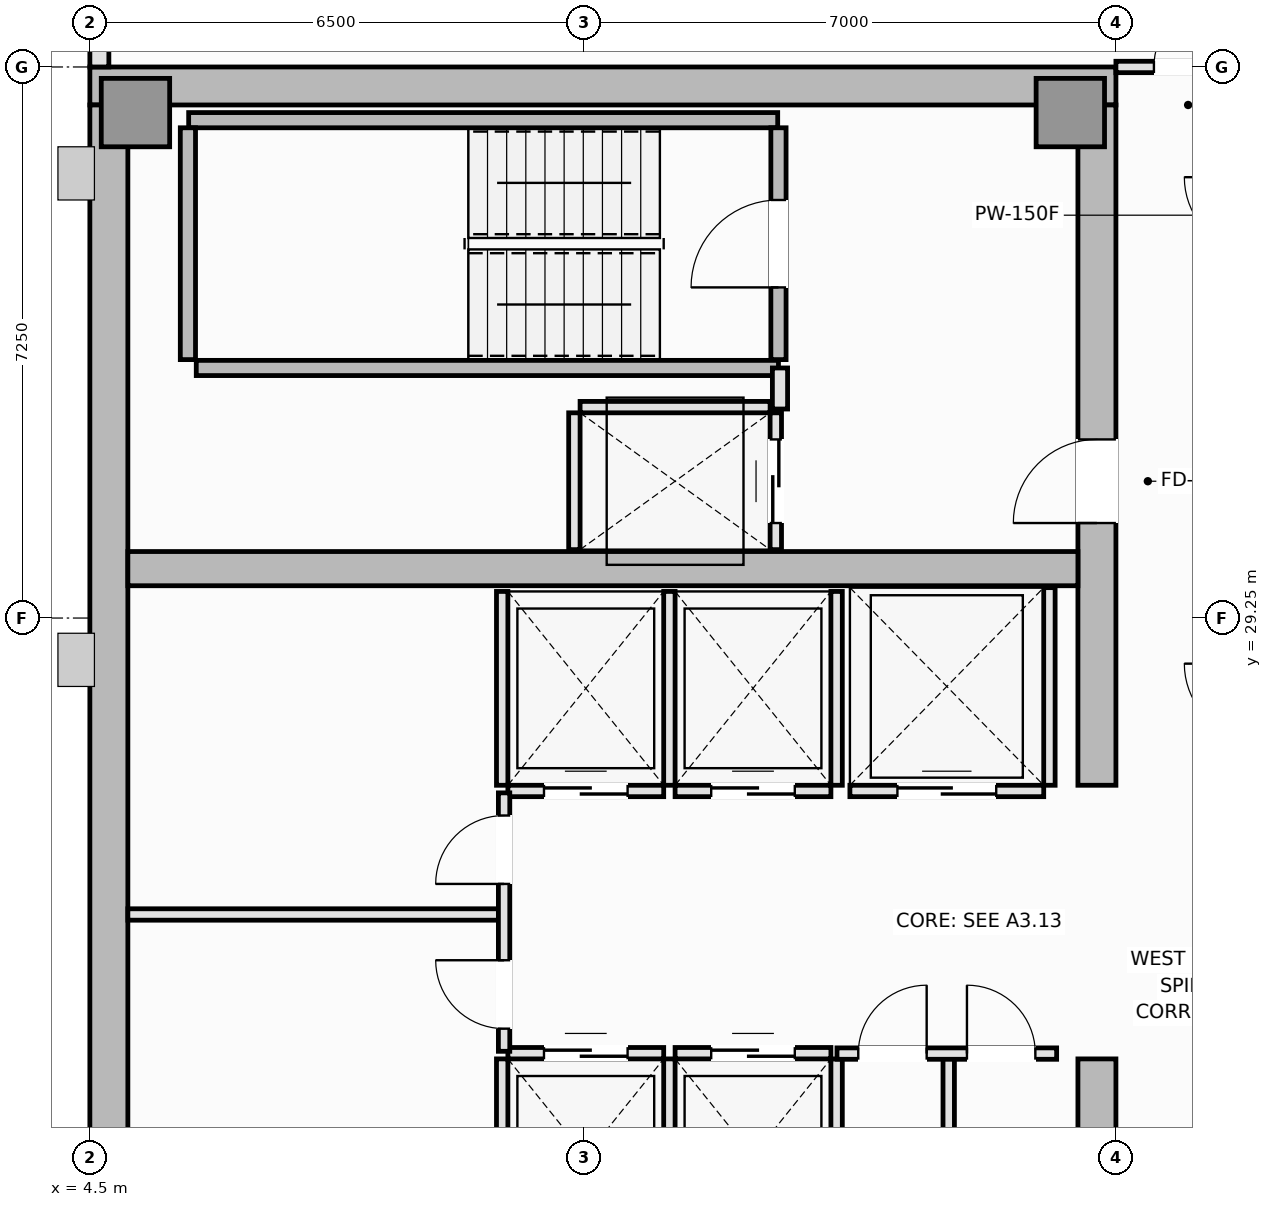
"""IFC4 building model, lengths in metres.
Left out: names, types, materials, properties, quantities, classifications, styles, units other than length and angle.
Written with IfcOpenShell. Run it as: python <this file> out.ifc"""

import sys

from ifc_helpers import new_model, si_unit, direction, frame, frame_2d, origin, origin_2d, place, context, subcontext, project, spatial, rectangle, extrude, element, fill, save


model = new_model("IFC4")
c1 = context("Model", 3, precision=1e-05, world=origin(), true_north=direction((0.0, 1.0)))
c2 = subcontext(c1, "Body", "Model", "MODEL_VIEW")
j1 = project(units=[si_unit("LENGTHUNIT", "METRE"), si_unit("PLANEANGLEUNIT", "RADIAN")], contexts=[c1])
p1 = place(None, origin())
s1 = spatial("IfcSite", under=j1, at=p1, CompositionType="ELEMENT")
p2 = place(p1, origin())
s2 = spatial("IfcBuilding", under=s1, at=p2, CompositionType="ELEMENT")
p3 = place(p2, frame((0.0, 0.0, 249.25)))
s3 = spatial("IfcBuildingStorey", under=s2, at=p3, CompositionType="ELEMENT", Elevation=249.25)
p4 = place(p3, frame((4.5, 36.25, 0.0), z_axis=(0.0, 0.0, 1.0), x_axis=(1.0, 0.0, 0.0)))
e1 = element("IfcWall", 1, at=p4, inside=s3, PredefinedType="SHEAR", context=c2, shape_type="SweptSolid", body=[
    extrude(rectangle(XDim=13.5, YDim=0.5, at=frame_2d((6.75, 0.0))), origin(), (0.0, 0.0, 1.0), 3.55),
])
p5 = place(p3, frame((4.75, 14.5, 0.0), z_axis=(0.0, 0.0, 1.0), x_axis=(0.0, 1.0, 0.0)))
e2 = element("IfcWall", 2, at=p5, inside=s3, PredefinedType="SHEAR", context=c2, shape_type="SweptSolid", body=[
    extrude(rectangle(XDim=21.5, YDim=0.5, at=frame_2d((10.75, 0.0))), origin(), (0.0, 0.0, 1.0), 3.55),
])
p6 = place(p3, frame((17.75, 14.5, 0.0), z_axis=(0.0, 0.0, 1.0), x_axis=(0.0, 1.0, 0.0)))
e3 = element("IfcWall", 3, at=p6, inside=s3, PredefinedType="SHEAR", context=c2, shape_type="SweptSolid", body=[
    extrude(rectangle(XDim=8.95, YDim=0.5, at=frame_2d((4.475, 0.0))), origin(), (0.0, 0.0, 1.0), 3.55),
])
p7 = place(p6, frame((4.4, 0.0, 0.0)))
e4 = element("IfcOpeningElement", 4, at=p7, cuts=e3, PredefinedType="OPENING", context=c2, shape_type="SweptSolid", body=[
    extrude(rectangle(XDim=1.1, YDim=2.15, at=frame_2d((0.55, 1.075))), frame((0.0, 0.26, 0.0), z_axis=(0.0, -1.0, 0.0), x_axis=(1.0, 0.0, 0.0)), (0.0, 0.0, 1.0), 0.52),
])
p8 = place(p3, frame((17.75, 27.05, 0.0), z_axis=(0.0, 0.0, 1.0), x_axis=(0.0, 1.0, 0.0)))
e5 = element("IfcWall", 5, at=p8, inside=s3, PredefinedType="SHEAR", context=c2, shape_type="SweptSolid", body=[
    extrude(rectangle(XDim=8.95, YDim=0.5, at=frame_2d((4.475, 0.0))), origin(), (0.0, 0.0, 1.0), 3.55),
])
p9 = place(p8, frame((3.45, 0.0, 0.0)))
e6 = element("IfcOpeningElement", 6, at=p9, cuts=e5, PredefinedType="OPENING", context=c2, shape_type="SweptSolid", body=[
    extrude(rectangle(XDim=1.1, YDim=2.15, at=frame_2d((0.55, 1.075))), frame((0.0, 0.26, 0.0), z_axis=(0.0, -1.0, 0.0), x_axis=(1.0, 0.0, 0.0)), (0.0, 0.0, 1.0), 0.52),
])
p10 = place(p3, frame((5.0, 29.9, 0.0), z_axis=(0.0, 0.0, 1.0), x_axis=(1.0, 0.0, 0.0)))
e7 = element("IfcWall", 7, at=p10, inside=s3, PredefinedType="SHEAR", context=c2, shape_type="SweptSolid", body=[
    extrude(rectangle(XDim=12.5, YDim=0.45, at=frame_2d((6.25, 0.0))), origin(), (0.0, 0.0, 1.0), 3.55),
])
for number, where, z_axis, x_axis in (
    (8, (5.1, 35.9, 0.0), (0.0, 0.0, 1.0), (1.0, 0.0, 0.0)),
    (9, (17.4, 35.9, 0.0), (0.0, 0.0, 1.0), (1.0, 0.0, 0.0)),
):
    element("IfcColumn", number, at=place(p3, frame(where, z_axis=z_axis, x_axis=x_axis)), inside=s3, PredefinedType="PILASTER", context=c2, shape_type="SweptSolid", body=[
        extrude(rectangle(XDim=0.9, YDim=0.9, at=origin_2d()), origin(), (0.0, 0.0, 1.0), 3.55),
    ])
p11 = place(p3, frame((4.625, 39.4, 0.0), z_axis=(0.0, 0.0, 1.0), x_axis=(0.0, -1.0, 0.0)))
e10 = element("IfcWall", 10, at=p11, inside=s3, PredefinedType="SOLIDWALL", context=c2, shape_type="SweptSolid", body=[
    extrude(rectangle(XDim=2.9, YDim=0.25, at=frame_2d((1.45, 0.0))), origin(), (0.0, 0.0, 1.0), 3.39),
])
p12 = place(p3, frame((5.8, 35.8, 0.0), z_axis=(0.0, 0.0, 1.0), x_axis=(1.0, 0.0, 0.0)))
e11 = element("IfcWall", 11, at=p12, inside=s3, PredefinedType="SOLIDWALL", context=c2, shape_type="SweptSolid", body=[
    extrude(rectangle(XDim=7.75, YDim=0.2, at=frame_2d((3.875, 0.0))), origin(), (0.0, 0.0, 1.0), 3.55),
])
p13 = place(p3, frame((5.79, 32.65, 0.0), z_axis=(0.0, 0.0, 1.0), x_axis=(0.0, 1.0, 0.0)))
e12 = element("IfcWall", 12, at=p13, inside=s3, PredefinedType="SOLIDWALL", context=c2, shape_type="SweptSolid", body=[
    extrude(rectangle(XDim=3.05, YDim=0.2, at=frame_2d((1.525, 0.0))), origin(), (0.0, 0.0, 1.0), 3.55),
])
p14 = place(p3, frame((5.9, 32.54, 0.0), z_axis=(0.0, 0.0, 1.0), x_axis=(1.0, 0.0, 0.0)))
e13 = element("IfcWall", 13, at=p14, inside=s3, PredefinedType="SOLIDWALL", context=c2, shape_type="SweptSolid", body=[
    extrude(rectangle(XDim=7.66, YDim=0.2, at=frame_2d((3.83, 0.0))), origin(), (0.0, 0.0, 1.0), 3.55),
])
p15 = place(p3, frame((13.56, 32.65, 0.0), z_axis=(0.0, 0.0, 1.0), x_axis=(0.0, 1.0, 0.0)))
e14 = element("IfcWall", 14, at=p15, inside=s3, PredefinedType="SOLIDWALL", context=c2, shape_type="SweptSolid", body=[
    extrude(rectangle(XDim=3.05, YDim=0.2, at=frame_2d((1.525, 0.0))), origin(), (0.0, 0.0, 1.0), 3.55),
])
p16 = place(p15, frame((0.95, 0.0, 0.0)))
e15 = element("IfcOpeningElement", 15, at=p16, cuts=e14, PredefinedType="OPENING", context=c2, shape_type="SweptSolid", body=[
    extrude(rectangle(XDim=1.15, YDim=2.15, at=frame_2d((0.575, 1.075))), frame((0.0, 0.11, 0.0), z_axis=(0.0, -1.0, 0.0), x_axis=(1.0, 0.0, 0.0)), (0.0, 0.0, 1.0), 0.22),
])
p17 = place(p3, frame((10.0, 23.525, 0.0), z_axis=(0.0, 0.0, 1.0), x_axis=(1.0, 0.0, 0.0)))
e16 = element("IfcWall", 16, at=p17, inside=s3, PredefinedType="PARTITIONING", context=c2, shape_type="SweptSolid", body=[
    extrude(rectangle(XDim=2.05, YDim=0.15, at=frame_2d((1.025, 0.0))), origin(), (0.0, 0.0, 1.0), 3.39),
])
p18 = place(p17, frame((0.475, 0.0, 0.0)))
e17 = element("IfcOpeningElement", 17, at=p18, cuts=e16, PredefinedType="OPENING", context=c2, shape_type="SweptSolid", body=[
    extrude(rectangle(XDim=1.1, YDim=2.2, at=frame_2d((0.55, 1.1))), frame((0.0, 0.085, 0.0), z_axis=(0.0, -1.0, 0.0), x_axis=(1.0, 0.0, 0.0)), (0.0, 0.0, 1.0), 0.17),
])
for number, where, z_axis, x_axis in (
    (18, (9.925, 20.9, 0.0), (0.0, 0.0, 1.0), (0.0, 1.0, 0.0)),
    (19, (12.125, 20.9, 0.0), (0.0, 0.0, 1.0), (0.0, 1.0, 0.0)),
):
    element("IfcWall", number, at=place(p3, frame(where, z_axis=z_axis, x_axis=x_axis)), inside=s3, PredefinedType="PARTITIONING", context=c2, shape_type="SweptSolid", body=[
        extrude(rectangle(XDim=2.55, YDim=0.15, at=frame_2d((1.275, 0.0))), origin(), (0.0, 0.0, 1.0), 3.39),
    ])
p19 = place(p3, frame((12.2, 23.525, 0.0), z_axis=(0.0, 0.0, 1.0), x_axis=(1.0, 0.0, 0.0)))
e20 = element("IfcWall", 20, at=p19, inside=s3, PredefinedType="PARTITIONING", context=c2, shape_type="SweptSolid", body=[
    extrude(rectangle(XDim=2.05, YDim=0.15, at=frame_2d((1.025, 0.0))), origin(), (0.0, 0.0, 1.0), 3.39),
])
p20 = place(p19, frame((0.475, 0.0, 0.0)))
e21 = element("IfcOpeningElement", 21, at=p20, cuts=e20, PredefinedType="OPENING", context=c2, shape_type="SweptSolid", body=[
    extrude(rectangle(XDim=1.1, YDim=2.2, at=frame_2d((0.55, 1.1))), frame((0.0, 0.085, 0.0), z_axis=(0.0, -1.0, 0.0), x_axis=(1.0, 0.0, 0.0)), (0.0, 0.0, 1.0), 0.17),
])
p21 = place(p3, frame((14.325, 20.9, 0.0), z_axis=(0.0, 0.0, 1.0), x_axis=(0.0, 1.0, 0.0)))
e22 = element("IfcWall", 22, at=p21, inside=s3, PredefinedType="PARTITIONING", context=c2, shape_type="SweptSolid", body=[
    extrude(rectangle(XDim=2.55, YDim=0.15, at=frame_2d((1.275, 0.0))), origin(), (0.0, 0.0, 1.0), 3.39),
])
p22 = place(p3, frame((10.0, 26.975, 0.0), z_axis=(0.0, 0.0, 1.0), x_axis=(1.0, 0.0, 0.0)))
e23 = element("IfcWall", 23, at=p22, inside=s3, PredefinedType="PARTITIONING", context=c2, shape_type="SweptSolid", body=[
    extrude(rectangle(XDim=2.05, YDim=0.15, at=frame_2d((1.025, 0.0))), origin(), (0.0, 0.0, 1.0), 3.39),
])
p23 = place(p22, frame((0.475, 0.0, 0.0)))
e24 = element("IfcOpeningElement", 24, at=p23, cuts=e23, PredefinedType="OPENING", context=c2, shape_type="SweptSolid", body=[
    extrude(rectangle(XDim=1.1, YDim=2.2, at=frame_2d((0.55, 1.1))), frame((0.0, 0.085, 0.0), z_axis=(0.0, -1.0, 0.0), x_axis=(1.0, 0.0, 0.0)), (0.0, 0.0, 1.0), 0.17),
])
for number, where, z_axis, x_axis in (
    (25, (9.925, 27.05, 0.0), (0.0, 0.0, 1.0), (0.0, 1.0, 0.0)),
    (26, (12.125, 27.05, 0.0), (0.0, 0.0, 1.0), (0.0, 1.0, 0.0)),
):
    element("IfcWall", number, at=place(p3, frame(where, z_axis=z_axis, x_axis=x_axis)), inside=s3, PredefinedType="PARTITIONING", context=c2, shape_type="SweptSolid", body=[
        extrude(rectangle(XDim=2.55, YDim=0.15, at=frame_2d((1.275, 0.0))), origin(), (0.0, 0.0, 1.0), 3.39),
    ])
p24 = place(p3, frame((12.2, 26.975, 0.0), z_axis=(0.0, 0.0, 1.0), x_axis=(1.0, 0.0, 0.0)))
e27 = element("IfcWall", 27, at=p24, inside=s3, PredefinedType="PARTITIONING", context=c2, shape_type="SweptSolid", body=[
    extrude(rectangle(XDim=2.05, YDim=0.15, at=frame_2d((1.025, 0.0))), origin(), (0.0, 0.0, 1.0), 3.39),
])
p25 = place(p24, frame((0.475, 0.0, 0.0)))
e28 = element("IfcOpeningElement", 28, at=p25, cuts=e27, PredefinedType="OPENING", context=c2, shape_type="SweptSolid", body=[
    extrude(rectangle(XDim=1.1, YDim=2.2, at=frame_2d((0.55, 1.1))), frame((0.0, 0.085, 0.0), z_axis=(0.0, -1.0, 0.0), x_axis=(1.0, 0.0, 0.0)), (0.0, 0.0, 1.0), 0.17),
])
p26 = place(p3, frame((14.325, 27.05, 0.0), z_axis=(0.0, 0.0, 1.0), x_axis=(0.0, 1.0, 0.0)))
e29 = element("IfcWall", 29, at=p26, inside=s3, PredefinedType="PARTITIONING", context=c2, shape_type="SweptSolid", body=[
    extrude(rectangle(XDim=2.55, YDim=0.15, at=frame_2d((1.275, 0.0))), origin(), (0.0, 0.0, 1.0), 3.39),
])
p27 = place(p3, frame((14.5, 26.975, 0.0), z_axis=(0.0, 0.0, 1.0), x_axis=(1.0, 0.0, 0.0)))
e30 = element("IfcWall", 30, at=p27, inside=s3, PredefinedType="PARTITIONING", context=c2, shape_type="SweptSolid", body=[
    extrude(rectangle(XDim=2.55, YDim=0.15, at=frame_2d((1.275, 0.0))), origin(), (0.0, 0.0, 1.0), 3.39),
])
p28 = place(p27, frame((0.625, 0.0, 0.0)))
e31 = element("IfcOpeningElement", 31, at=p28, cuts=e30, PredefinedType="OPENING", context=c2, shape_type="SweptSolid", body=[
    extrude(rectangle(XDim=1.3, YDim=2.2, at=frame_2d((0.65, 1.1))), frame((0.0, 0.085, 0.0), z_axis=(0.0, -1.0, 0.0), x_axis=(1.0, 0.0, 0.0)), (0.0, 0.0, 1.0), 0.17),
])
p29 = place(p3, frame((17.125, 27.05, 0.0), z_axis=(0.0, 0.0, 1.0), x_axis=(0.0, 1.0, 0.0)))
e32 = element("IfcWall", 32, at=p29, inside=s3, PredefinedType="PARTITIONING", context=c2, shape_type="SweptSolid", body=[
    extrude(rectangle(XDim=2.6, YDim=0.15, at=frame_2d((1.3, 0.0))), origin(), (0.0, 0.0, 1.0), 3.39),
])
p30 = place(p3, frame((10.95, 32.025, 0.0), z_axis=(0.0, 0.0, 1.0), x_axis=(1.0, 0.0, 0.0)))
e33 = element("IfcWall", 33, at=p30, inside=s3, PredefinedType="PARTITIONING", context=c2, shape_type="SweptSolid", body=[
    extrude(rectangle(XDim=2.5, YDim=0.15, at=frame_2d((1.25, 0.0))), origin(), (0.0, 0.0, 1.0), 3.39),
])
p31 = place(p3, frame((10.875, 30.15, 0.0), z_axis=(0.0, 0.0, 1.0), x_axis=(0.0, 1.0, 0.0)))
e34 = element("IfcWall", 34, at=p31, inside=s3, PredefinedType="PARTITIONING", context=c2, shape_type="SweptSolid", body=[
    extrude(rectangle(XDim=1.8, YDim=0.15, at=frame_2d((0.9, 0.0))), origin(), (0.0, 0.0, 1.0), 3.39),
])
p32 = place(p3, frame((13.525, 30.15, 0.0), z_axis=(0.0, 0.0, 1.0), x_axis=(0.0, 1.0, 0.0)))
e35 = element("IfcWall", 35, at=p32, inside=s3, PredefinedType="PARTITIONING", context=c2, shape_type="SweptSolid", body=[
    extrude(rectangle(XDim=1.8, YDim=0.15, at=frame_2d((0.9, 0.0))), origin(), (0.0, 0.0, 1.0), 3.39),
])
p33 = place(p32, frame((0.35, 0.0, 0.0)))
e36 = element("IfcOpeningElement", 36, at=p33, cuts=e35, PredefinedType="OPENING", context=c2, shape_type="SweptSolid", body=[
    extrude(rectangle(XDim=1.1, YDim=2.2, at=frame_2d((0.55, 1.1))), frame((0.0, 0.085, 0.0), z_axis=(0.0, -1.0, 0.0), x_axis=(1.0, 0.0, 0.0)), (0.0, 0.0, 1.0), 0.17),
])
p34 = place(p3, frame((13.58, 32.0, 0.0), z_axis=(0.0, 0.0, 1.0), x_axis=(0.0, 1.0, 0.0)))
e37 = element("IfcWall", 37, at=p34, inside=s3, PredefinedType="PARTITIONING", context=c2, shape_type="SweptSolid", body=[
    extrude(rectangle(XDim=0.54, YDim=0.2, at=frame_2d((0.27, 0.0))), origin(), (0.0, 0.0, 1.0), 3.39),
])
p35 = place(p3, frame((5.0, 25.35, 0.0), z_axis=(0.0, 0.0, 1.0), x_axis=(1.0, 0.0, 0.0)))
e38 = element("IfcWall", 38, at=p35, inside=s3, PredefinedType="PARTITIONING", context=c2, shape_type="SweptSolid", body=[
    extrude(rectangle(XDim=4.95, YDim=0.15, at=frame_2d((2.475, 0.0))), origin(), (0.0, 0.0, 1.0), 3.39),
])
p36 = place(p3, frame((9.95, 23.55, 0.0), z_axis=(0.0, 0.0, 1.0), x_axis=(0.0, 1.0, 0.0)))
e39 = element("IfcWall", 39, at=p36, inside=s3, PredefinedType="PARTITIONING", context=c2, shape_type="SweptSolid", body=[
    extrude(rectangle(XDim=3.4, YDim=0.15, at=frame_2d((1.7, 0.0))), origin(), (0.0, 0.0, 1.0), 3.39),
])
p37 = place(p36, frame((0.298, 0.0, 0.0)))
e40 = element("IfcOpeningElement", 40, at=p37, cuts=e39, PredefinedType="OPENING", context=c2, shape_type="SweptSolid", body=[
    extrude(rectangle(XDim=0.9, YDim=2.1, at=frame_2d((0.45, 1.05))), frame((0.0, 0.085, 0.0), z_axis=(0.0, -1.0, 0.0), x_axis=(1.0, 0.0, 0.0)), (0.0, 0.0, 1.0), 0.17),
])
p38 = place(p36, frame((2.202, 0.0, 0.0)))
e41 = element("IfcOpeningElement", 41, at=p38, cuts=e39, PredefinedType="OPENING", context=c2, shape_type="SweptSolid", body=[
    extrude(rectangle(XDim=0.9, YDim=2.1, at=frame_2d((0.45, 1.05))), frame((0.0, 0.085, 0.0), z_axis=(0.0, -1.0, 0.0), x_axis=(1.0, 0.0, 0.0)), (0.0, 0.0, 1.0), 0.17),
])
p39 = place(p3, frame((15.8, 20.85, 0.0), z_axis=(0.0, 0.0, 1.0), x_axis=(0.0, 1.0, 0.0)))
e42 = element("IfcWall", 42, at=p39, inside=s3, PredefinedType="PARTITIONING", context=c2, shape_type="SweptSolid", body=[
    extrude(rectangle(XDim=2.67, YDim=0.15, at=frame_2d((1.335, 0.0))), origin(), (0.0, 0.0, 1.0), 3.39),
])
p40 = place(p3, frame((14.33, 23.52, 0.0), z_axis=(0.0, 0.0, 1.0), x_axis=(1.0, 0.0, 0.0)))
e43 = element("IfcWall", 43, at=p40, inside=s3, PredefinedType="PARTITIONING", context=c2, shape_type="SweptSolid", body=[
    extrude(rectangle(XDim=2.89, YDim=0.15, at=frame_2d((1.445, 0.0))), origin(), (0.0, 0.0, 1.0), 3.39),
])
p41 = place(p40, frame((0.28, 0.0, 0.0)))
e44 = element("IfcOpeningElement", 44, at=p41, cuts=e43, PredefinedType="OPENING", context=c2, shape_type="SweptSolid", body=[
    extrude(rectangle(XDim=0.9, YDim=2.1, at=frame_2d((0.45, 1.05))), frame((0.0, 0.085, 0.0), z_axis=(0.0, -1.0, 0.0), x_axis=(1.0, 0.0, 0.0)), (0.0, 0.0, 1.0), 0.17),
])
p42 = place(p40, frame((1.71, 0.0, 0.0)))
e45 = element("IfcOpeningElement", 45, at=p42, cuts=e43, PredefinedType="OPENING", context=c2, shape_type="SweptSolid", body=[
    extrude(rectangle(XDim=0.9, YDim=2.1, at=frame_2d((0.45, 1.05))), frame((0.0, 0.085, 0.0), z_axis=(0.0, -1.0, 0.0), x_axis=(1.0, 0.0, 0.0)), (0.0, 0.0, 1.0), 0.17),
])
p43 = place(p3, frame((18.0, 36.5, 0.0), z_axis=(0.0, 0.0, 1.0), x_axis=(1.0, 0.0, 0.0)))
e46 = element("IfcWall", 46, at=p43, inside=s3, PredefinedType="PARTITIONING", context=c2, shape_type="SweptSolid", body=[
    extrude(rectangle(XDim=1.9, YDim=0.15, at=frame_2d((0.95, 0.0))), origin(), (0.0, 0.0, 1.0), 3.39),
])
p44 = place(p43, frame((0.5, 0.0, 0.0)))
e47 = element("IfcOpeningElement", 47, at=p44, cuts=e46, PredefinedType="OPENING", context=c2, shape_type="SweptSolid", body=[
    extrude(rectangle(XDim=0.9, YDim=2.1, at=frame_2d((0.45, 1.05))), frame((0.0, 0.085, 0.0), z_axis=(0.0, -1.0, 0.0), x_axis=(1.0, 0.0, 0.0)), (0.0, 0.0, 1.0), 0.17),
])
p45 = place(p16, origin())
e48 = element("IfcDoor", 48, at=p45, inside=s3, OperationType="SINGLE_SWING_LEFT", PredefinedType="DOOR", context=c2, shape_type="SweptSolid", body=[
    extrude(rectangle(XDim=1.15, YDim=2.15, at=frame_2d((0.575, 1.075))), frame((0.0, 0.025, 0.0), z_axis=(0.0, -1.0, 0.0), x_axis=(1.0, 0.0, 0.0)), (0.0, 0.0, 1.0), 0.05),
])
fill(e15, e48)
p46 = place(p18, origin())
e49 = element("IfcDoor", 49, at=p46, inside=s3, OperationType="DOUBLE_DOOR_SLIDING", PredefinedType="DOOR", context=c2, shape_type="SweptSolid", body=[
    extrude(rectangle(XDim=1.1, YDim=2.2, at=frame_2d((0.55, 1.1))), frame((0.0, 0.025, 0.0), z_axis=(0.0, -1.0, 0.0), x_axis=(1.0, 0.0, 0.0)), (0.0, 0.0, 1.0), 0.05),
])
fill(e17, e49)
p47 = place(p20, origin())
e50 = element("IfcDoor", 50, at=p47, inside=s3, OperationType="DOUBLE_DOOR_SLIDING", PredefinedType="DOOR", context=c2, shape_type="SweptSolid", body=[
    extrude(rectangle(XDim=1.1, YDim=2.2, at=frame_2d((0.55, 1.1))), frame((0.0, 0.025, 0.0), z_axis=(0.0, -1.0, 0.0), x_axis=(1.0, 0.0, 0.0)), (0.0, 0.0, 1.0), 0.05),
])
fill(e21, e50)
p48 = place(p23, origin())
e51 = element("IfcDoor", 51, at=p48, inside=s3, OperationType="DOUBLE_DOOR_SLIDING", PredefinedType="DOOR", context=c2, shape_type="SweptSolid", body=[
    extrude(rectangle(XDim=1.1, YDim=2.2, at=frame_2d((0.55, 1.1))), frame((0.0, 0.025, 0.0), z_axis=(0.0, -1.0, 0.0), x_axis=(1.0, 0.0, 0.0)), (0.0, 0.0, 1.0), 0.05),
])
fill(e24, e51)
p49 = place(p25, origin())
e52 = element("IfcDoor", 52, at=p49, inside=s3, OperationType="DOUBLE_DOOR_SLIDING", PredefinedType="DOOR", context=c2, shape_type="SweptSolid", body=[
    extrude(rectangle(XDim=1.1, YDim=2.2, at=frame_2d((0.55, 1.1))), frame((0.0, 0.025, 0.0), z_axis=(0.0, -1.0, 0.0), x_axis=(1.0, 0.0, 0.0)), (0.0, 0.0, 1.0), 0.05),
])
fill(e28, e52)
p50 = place(p28, origin())
e53 = element("IfcDoor", 53, at=p50, inside=s3, OperationType="DOUBLE_DOOR_SLIDING", PredefinedType="DOOR", context=c2, shape_type="SweptSolid", body=[
    extrude(rectangle(XDim=1.3, YDim=2.2, at=frame_2d((0.65, 1.1))), frame((0.0, 0.025, 0.0), z_axis=(0.0, -1.0, 0.0), x_axis=(1.0, 0.0, 0.0)), (0.0, 0.0, 1.0), 0.05),
])
fill(e31, e53)
p51 = place(p33, origin())
e54 = element("IfcDoor", 54, at=p51, inside=s3, OperationType="DOUBLE_DOOR_SLIDING", PredefinedType="DOOR", context=c2, shape_type="SweptSolid", body=[
    extrude(rectangle(XDim=1.1, YDim=2.2, at=frame_2d((0.55, 1.1))), frame((0.0, 0.025, 0.0), z_axis=(0.0, -1.0, 0.0), x_axis=(1.0, 0.0, 0.0)), (0.0, 0.0, 1.0), 0.05),
])
fill(e36, e54)
p52 = place(p9, origin())
e55 = element("IfcDoor", 55, at=p52, inside=s3, OperationType="SINGLE_SWING_LEFT", PredefinedType="DOOR", context=c2, shape_type="SweptSolid", body=[
    extrude(rectangle(XDim=1.1, YDim=2.15, at=frame_2d((0.55, 1.075))), frame((0.0, 0.025, 0.0), z_axis=(0.0, -1.0, 0.0), x_axis=(1.0, 0.0, 0.0)), (0.0, 0.0, 1.0), 0.05),
])
fill(e6, e55)
p53 = place(p37, origin())
e56 = element("IfcDoor", 56, at=p53, inside=s3, OperationType="SINGLE_SWING_RIGHT", PredefinedType="DOOR", context=c2, shape_type="SweptSolid", body=[
    extrude(rectangle(XDim=0.9, YDim=2.1, at=frame_2d((0.45, 1.05))), frame((0.0, 0.025, 0.0), z_axis=(0.0, -1.0, 0.0), x_axis=(1.0, 0.0, 0.0)), (0.0, 0.0, 1.0), 0.05),
])
fill(e40, e56)
p54 = place(p38, origin())
e57 = element("IfcDoor", 57, at=p54, inside=s3, OperationType="SINGLE_SWING_LEFT", PredefinedType="DOOR", context=c2, shape_type="SweptSolid", body=[
    extrude(rectangle(XDim=0.9, YDim=2.1, at=frame_2d((0.45, 1.05))), frame((0.0, 0.025, 0.0), z_axis=(0.0, -1.0, 0.0), x_axis=(1.0, 0.0, 0.0)), (0.0, 0.0, 1.0), 0.05),
])
fill(e41, e57)
p55 = place(p41, origin())
e58 = element("IfcDoor", 58, at=p55, inside=s3, OperationType="SINGLE_SWING_RIGHT", PredefinedType="DOOR", context=c2, shape_type="SweptSolid", body=[
    extrude(rectangle(XDim=0.9, YDim=2.1, at=frame_2d((0.45, 1.05))), frame((0.0, 0.025, 0.0), z_axis=(0.0, -1.0, 0.0), x_axis=(1.0, 0.0, 0.0)), (0.0, 0.0, 1.0), 0.05),
])
fill(e44, e58)
p56 = place(p42, origin())
e59 = element("IfcDoor", 59, at=p56, inside=s3, OperationType="SINGLE_SWING_LEFT", PredefinedType="DOOR", context=c2, shape_type="SweptSolid", body=[
    extrude(rectangle(XDim=0.9, YDim=2.1, at=frame_2d((0.45, 1.05))), frame((0.0, 0.025, 0.0), z_axis=(0.0, -1.0, 0.0), x_axis=(1.0, 0.0, 0.0)), (0.0, 0.0, 1.0), 0.05),
])
fill(e45, e59)
p57 = place(p44, origin())
e60 = element("IfcDoor", 60, at=p57, inside=s3, OperationType="SINGLE_SWING_RIGHT", PredefinedType="DOOR", context=c2, shape_type="SweptSolid", body=[
    extrude(rectangle(XDim=0.9, YDim=2.1, at=frame_2d((0.45, 1.05))), frame((0.0, 0.025, 0.0), z_axis=(0.0, -1.0, 0.0), x_axis=(1.0, 0.0, 0.0)), (0.0, 0.0, 1.0), 0.05),
])
fill(e47, e60)
save(model, sys.argv[1])
